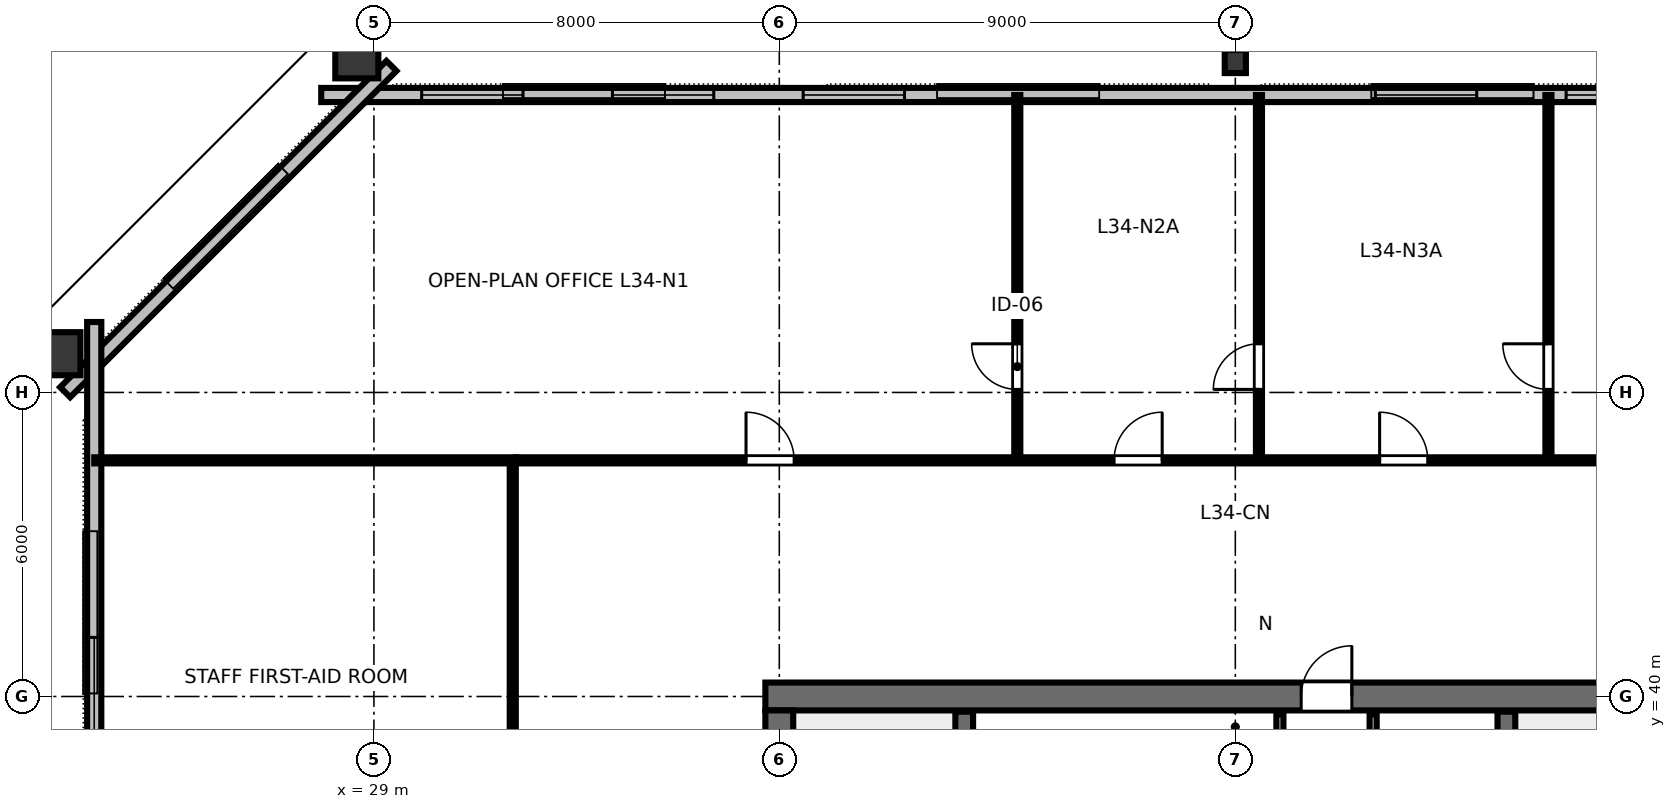
"""IFC4 building model, lengths in metres.
Left out: names, types, materials, properties, quantities, classifications, styles, units other than length and angle.
Written with IfcOpenShell. Run it as: python <this file> out.ifc"""

import sys

from ifc_helpers import new_model, si_unit, direction, frame, frame_2d, origin, origin_2d, place, context, subcontext, project, spatial, rectangle, hollow_rectangle, i_section, extrude, element, fill, save


model = new_model("IFC4")
c1 = context("Model", 3, precision=1e-05, world=origin(), true_north=direction((0.0, 1.0)))
c2 = subcontext(c1, "Body", "Model", "MODEL_VIEW")
j1 = project(units=[si_unit("LENGTHUNIT", "METRE"), si_unit("PLANEANGLEUNIT", "RADIAN")], contexts=[c1])
p1 = place(None, origin())
s1 = spatial("IfcSite", under=j1, at=p1, CompositionType="ELEMENT")
p2 = place(p1, origin())
s2 = spatial("IfcBuilding", under=s1, at=p2, CompositionType="ELEMENT")
p3 = place(p2, frame((0.0, 0.0, 131.2)))
s3 = spatial("IfcBuildingStorey", under=s2, at=p3, CompositionType="ELEMENT", Elevation=131.2)
p4 = place(p3, frame((36.725, 40.0, 0.0), z_axis=(0.0, 0.0, 1.0), x_axis=(1.0, 0.0, 0.0)))
e1 = element("IfcWall", 1, at=p4, inside=s3, PredefinedType="SHEAR", context=c2, shape_type="SweptSolid", body=[
    extrude(rectangle(XDim=18.55, YDim=0.55, at=frame_2d((9.275, 0.0))), origin(), (0.0, 0.0, 1.0), 3.36),
])
p5 = place(p4, frame((10.575, 0.0, 0.0)))
e2 = element("IfcOpeningElement", 2, at=p5, cuts=e1, PredefinedType="OPENING", context=c2, shape_type="SweptSolid", body=[
    extrude(rectangle(XDim=1.0, YDim=2.15, at=frame_2d((0.5, 1.075))), frame((0.0, 0.285, 0.0), z_axis=(0.0, -1.0, 0.0), x_axis=(1.0, 0.0, 0.0)), (0.0, 0.0, 1.0), 0.57),
])
p6 = place(p3, frame((37.0, 24.275, 0.0), z_axis=(0.0, 0.0, 1.0), x_axis=(0.0, 1.0, 0.0)))
e3 = element("IfcWall", 3, at=p6, inside=s3, PredefinedType="SHEAR", context=c2, shape_type="SweptSolid", body=[
    extrude(rectangle(XDim=15.45, YDim=0.55, at=frame_2d((7.725, 0.0))), origin(), (0.0, 0.0, 1.0), 3.36),
])
p7 = place(p6, frame((5.25, 0.0, 0.0)))
e4 = element("IfcOpeningElement", 4, at=p7, cuts=e3, PredefinedType="OPENING", context=c2, shape_type="SweptSolid", body=[
    extrude(rectangle(XDim=1.15, YDim=2.15, at=frame_2d((0.575, 1.075))), frame((0.0, 0.285, 0.0), z_axis=(0.0, -1.0, 0.0), x_axis=(1.0, 0.0, 0.0)), (0.0, 0.0, 1.0), 0.57),
])
p8 = place(p3, frame((46.0, 52.53, 0.0), z_axis=(0.0, 0.0, 1.0), x_axis=(1.0, 0.0, 0.0)))
e5 = element("IfcColumn", 5, at=p8, inside=s3, PredefinedType="COLUMN", context=c2, shape_type="SweptSolid", body=[
    extrude(i_section(OverallWidth=0.418, OverallDepth=0.455, WebThickness=0.042, FlangeThickness=0.068, FilletRadius=0.025, at=origin_2d()), origin(), (0.0, 0.0, 1.0), 3.358),
])
for number, where, z_axis, x_axis in (
    (6, (28.662, 52.698, 0.0), (0.0, 0.0, 1.0), (1.0, 0.0, 0.0)),
    (7, (22.708, 46.764, 0.0), (0.0, 0.0, 1.0), (0.0, 1.0, 0.0)),
):
    element("IfcColumn", number, at=place(p3, frame(where, z_axis=z_axis, x_axis=x_axis)), inside=s3, PredefinedType="COLUMN", context=c2, shape_type="SweptSolid", body=[
        extrude(hollow_rectangle(XDim=0.85, YDim=1.0, WallThickness=0.05, at=origin_2d()), origin(), (0.0, 0.0, 1.0), 3.358),
    ])
p9 = place(p3, frame((64.04, 51.87, 0.0), z_axis=(0.0, 0.0, 1.0), x_axis=(-1.0, 0.0, 0.0)))
e8 = element("IfcWall", 8, at=p9, inside=s3, PredefinedType="STANDARD", context=c2, shape_type="SweptSolid", body=[
    extrude(rectangle(XDim=36.08, YDim=0.28, at=frame_2d((18.04, 0.0))), origin(), (0.0, 0.0, 1.0), 3.36),
])
p10 = place(p9, frame((1.982, 0.0, 0.8)))
e9 = element("IfcOpeningElement", 9, at=p10, cuts=e8, PredefinedType="OPENING", context=c2, shape_type="SweptSolid", body=[
    extrude(rectangle(XDim=2.0, YDim=1.95, at=frame_2d((1.0, 0.975))), frame((0.0, 0.15, 0.0), z_axis=(0.0, -1.0, 0.0), x_axis=(1.0, 0.0, 0.0)), (0.0, 0.0, 1.0), 0.3),
])
p11 = place(p9, frame((5.747, 0.0, 0.8)))
e10 = element("IfcOpeningElement", 10, at=p11, cuts=e8, PredefinedType="OPENING", context=c2, shape_type="SweptSolid", body=[
    extrude(rectangle(XDim=2.0, YDim=1.95, at=frame_2d((1.0, 0.975))), frame((0.0, 0.15, 0.0), z_axis=(0.0, -1.0, 0.0), x_axis=(1.0, 0.0, 0.0)), (0.0, 0.0, 1.0), 0.3),
])
p12 = place(p9, frame((9.511, 0.0, 0.8)))
e11 = element("IfcOpeningElement", 11, at=p12, cuts=e8, PredefinedType="OPENING", context=c2, shape_type="SweptSolid", body=[
    extrude(rectangle(XDim=2.0, YDim=1.95, at=frame_2d((1.0, 0.975))), frame((0.0, 0.15, 0.0), z_axis=(0.0, -1.0, 0.0), x_axis=(1.0, 0.0, 0.0)), (0.0, 0.0, 1.0), 0.3),
])
p13 = place(p9, frame((13.276, 0.0, 0.8)))
e12 = element("IfcOpeningElement", 12, at=p13, cuts=e8, PredefinedType="OPENING", context=c2, shape_type="SweptSolid", body=[
    extrude(rectangle(XDim=2.0, YDim=1.95, at=frame_2d((1.0, 0.975))), frame((0.0, 0.15, 0.0), z_axis=(0.0, -1.0, 0.0), x_axis=(1.0, 0.0, 0.0)), (0.0, 0.0, 1.0), 0.3),
])
p14 = place(p9, frame((24.569, 0.0, 0.8)))
e13 = element("IfcOpeningElement", 13, at=p14, cuts=e8, PredefinedType="OPENING", context=c2, shape_type="SweptSolid", body=[
    extrude(rectangle(XDim=2.0, YDim=1.95, at=frame_2d((1.0, 0.975))), frame((0.0, 0.15, 0.0), z_axis=(0.0, -1.0, 0.0), x_axis=(1.0, 0.0, 0.0)), (0.0, 0.0, 1.0), 0.3),
])
p15 = place(p9, frame((28.333, 0.0, 0.8)))
e14 = element("IfcOpeningElement", 14, at=p15, cuts=e8, PredefinedType="OPENING", context=c2, shape_type="SweptSolid", body=[
    extrude(rectangle(XDim=2.0, YDim=1.95, at=frame_2d((1.0, 0.975))), frame((0.0, 0.15, 0.0), z_axis=(0.0, -1.0, 0.0), x_axis=(1.0, 0.0, 0.0)), (0.0, 0.0, 1.0), 0.3),
])
p16 = place(p9, frame((32.098, 0.0, 0.8)))
e15 = element("IfcOpeningElement", 15, at=p16, cuts=e8, PredefinedType="OPENING", context=c2, shape_type="SweptSolid", body=[
    extrude(rectangle(XDim=2.0, YDim=1.95, at=frame_2d((1.0, 0.975))), frame((0.0, 0.15, 0.0), z_axis=(0.0, -1.0, 0.0), x_axis=(1.0, 0.0, 0.0)), (0.0, 0.0, 1.0), 0.3),
])
p17 = place(p3, frame((29.345, 52.444, 0.0), z_axis=(0.0, 0.0, 1.0), x_axis=(-0.707106781187, -0.707106781187, 0.0)))
e16 = element("IfcWall", 16, at=p17, inside=s3, PredefinedType="STANDARD", context=c2, shape_type="SweptSolid", body=[
    extrude(rectangle(XDim=9.107, YDim=0.28, at=frame_2d((4.553, 0.0))), origin(), (0.0, 0.0, 1.0), 3.36),
])
p18 = place(p3, frame((23.48, 47.39, 0.0), z_axis=(0.0, 0.0, 1.0), x_axis=(0.0, -1.0, 0.0)))
e17 = element("IfcWall", 17, at=p18, inside=s3, PredefinedType="STANDARD", context=c2, shape_type="SweptSolid", body=[
    extrude(rectangle(XDim=30.78, YDim=0.28, at=frame_2d((15.39, 0.0))), origin(), (0.0, 0.0, 1.0), 3.36),
])
p19 = place(p18, frame((6.224, 0.0, 0.8)))
e18 = element("IfcOpeningElement", 18, at=p19, cuts=e17, PredefinedType="OPENING", context=c2, shape_type="SweptSolid", body=[
    extrude(rectangle(XDim=2.0, YDim=1.95, at=frame_2d((1.0, 0.975))), frame((0.0, 0.15, 0.0), z_axis=(0.0, -1.0, 0.0), x_axis=(1.0, 0.0, 0.0)), (0.0, 0.0, 1.0), 0.3),
])
p20 = place(p18, frame((10.307, 0.0, 0.8)))
e19 = element("IfcOpeningElement", 19, at=p20, cuts=e17, PredefinedType="OPENING", context=c2, shape_type="SweptSolid", body=[
    extrude(rectangle(XDim=2.0, YDim=1.95, at=frame_2d((1.0, 0.975))), frame((0.0, 0.15, 0.0), z_axis=(0.0, -1.0, 0.0), x_axis=(1.0, 0.0, 0.0)), (0.0, 0.0, 1.0), 0.3),
])
p21 = place(p18, frame((18.473, 0.0, 0.8)))
e20 = element("IfcOpeningElement", 20, at=p21, cuts=e17, PredefinedType="OPENING", context=c2, shape_type="SweptSolid", body=[
    extrude(rectangle(XDim=2.0, YDim=1.95, at=frame_2d((1.0, 0.975))), frame((0.0, 0.15, 0.0), z_axis=(0.0, -1.0, 0.0), x_axis=(1.0, 0.0, 0.0)), (0.0, 0.0, 1.0), 0.3),
])
p22 = place(p18, frame((22.556, 0.0, 0.8)))
e21 = element("IfcOpeningElement", 21, at=p22, cuts=e17, PredefinedType="OPENING", context=c2, shape_type="SweptSolid", body=[
    extrude(rectangle(XDim=2.0, YDim=1.95, at=frame_2d((1.0, 0.975))), frame((0.0, 0.15, 0.0), z_axis=(0.0, -1.0, 0.0), x_axis=(1.0, 0.0, 0.0)), (0.0, 0.0, 1.0), 0.3),
])
for number, where, z_axis, x_axis in (
    (22, (40.65, 32.0, 0.0), (0.0, 0.0, 1.0), (0.0, 1.0, 0.0)),
    (23, (51.35, 32.0, 0.0), (0.0, 0.0, 1.0), (0.0, 1.0, 0.0)),
):
    element("IfcWall", number, at=place(p3, frame(where, z_axis=z_axis, x_axis=x_axis)), inside=s3, PredefinedType="SHEAR", context=c2, shape_type="SweptSolid", body=[
        extrude(rectangle(XDim=7.7, YDim=0.35, at=frame_2d((3.85, 0.0))), origin(), (0.0, 0.0, 1.0), 3.6),
    ])
p23 = place(p3, frame((46.88, 32.05, 0.0), z_axis=(0.0, 0.0, 1.0), x_axis=(0.0, 1.0, 0.0)))
e24 = element("IfcWall", 24, at=p23, inside=s3, PredefinedType="PARTITIONING", context=c2, shape_type="SweptSolid", body=[
    extrude(rectangle(XDim=7.6, YDim=0.14, at=frame_2d((3.8, 0.0))), origin(), (0.0, 0.0, 1.0), 3.36),
])
p24 = place(p23, frame((3.4, 0.0, 0.0)))
e25 = element("IfcOpeningElement", 25, at=p24, cuts=e24, PredefinedType="OPENING", context=c2, shape_type="SweptSolid", body=[
    extrude(rectangle(XDim=0.95, YDim=2.15, at=frame_2d((0.475, 1.075))), frame((0.0, 0.08, 0.0), z_axis=(0.0, -1.0, 0.0), x_axis=(1.0, 0.0, 0.0)), (0.0, 0.0, 1.0), 0.16),
])
p25 = place(p3, frame((48.72, 32.05, 0.0), z_axis=(0.0, 0.0, 1.0), x_axis=(0.0, 1.0, 0.0)))
e26 = element("IfcWall", 26, at=p25, inside=s3, PredefinedType="PARTITIONING", context=c2, shape_type="SweptSolid", body=[
    extrude(rectangle(XDim=7.6, YDim=0.14, at=frame_2d((3.8, 0.0))), origin(), (0.0, 0.0, 1.0), 3.36),
])
p26 = place(p25, frame((0.8, 0.0, 0.0)))
e27 = element("IfcOpeningElement", 27, at=p26, cuts=e26, PredefinedType="OPENING", context=c2, shape_type="SweptSolid", body=[
    extrude(rectangle(XDim=0.9, YDim=2.15, at=frame_2d((0.45, 1.075))), frame((0.0, 0.08, 0.0), z_axis=(0.0, -1.0, 0.0), x_axis=(1.0, 0.0, 0.0)), (0.0, 0.0, 1.0), 0.16),
])
p27 = place(p25, frame((3.35, 0.0, 0.0)))
e28 = element("IfcOpeningElement", 28, at=p27, cuts=e26, PredefinedType="OPENING", context=c2, shape_type="SweptSolid", body=[
    extrude(rectangle(XDim=0.9, YDim=2.15, at=frame_2d((0.45, 1.075))), frame((0.0, 0.08, 0.0), z_axis=(0.0, -1.0, 0.0), x_axis=(1.0, 0.0, 0.0)), (0.0, 0.0, 1.0), 0.16),
])
p28 = place(p25, frame((5.9, 0.0, 0.0)))
e29 = element("IfcOpeningElement", 29, at=p28, cuts=e26, PredefinedType="OPENING", context=c2, shape_type="SweptSolid", body=[
    extrude(rectangle(XDim=0.92, YDim=2.15, at=frame_2d((0.46, 1.075))), frame((0.0, 0.08, 0.0), z_axis=(0.0, -1.0, 0.0), x_axis=(1.0, 0.0, 0.0)), (0.0, 0.0, 1.0), 0.16),
])
p29 = place(p3, frame((41.697, 44.66, 0.0), z_axis=(0.0, 0.0, 1.0), x_axis=(0.0, 1.0, 0.0)))
e30 = element("IfcWall", 30, at=p29, inside=s3, PredefinedType="PARTITIONING", context=c2, shape_type="SweptSolid", body=[
    extrude(rectangle(XDim=7.21, YDim=0.12, at=frame_2d((3.605, 0.0))), origin(), (0.0, 0.0, 1.0), 2.64),
])
p30 = place(p29, frame((1.4, 0.0, 0.0)))
e31 = element("IfcOpeningElement", 31, at=p30, cuts=e30, PredefinedType="OPENING", context=c2, shape_type="SweptSolid", body=[
    extrude(rectangle(XDim=0.9, YDim=2.15, at=frame_2d((0.45, 1.075))), frame((0.0, 0.07, 0.0), z_axis=(0.0, -1.0, 0.0), x_axis=(1.0, 0.0, 0.0)), (0.0, 0.0, 1.0), 0.14),
])
p31 = place(p3, frame((46.467, 44.66, 0.0), z_axis=(0.0, 0.0, 1.0), x_axis=(0.0, 1.0, 0.0)))
e32 = element("IfcWall", 32, at=p31, inside=s3, PredefinedType="PARTITIONING", context=c2, shape_type="SweptSolid", body=[
    extrude(rectangle(XDim=7.21, YDim=0.12, at=frame_2d((3.605, 0.0))), origin(), (0.0, 0.0, 1.0), 2.64),
])
p32 = place(p31, frame((1.4, 0.0, 0.0)))
e33 = element("IfcOpeningElement", 33, at=p32, cuts=e32, PredefinedType="OPENING", context=c2, shape_type="SweptSolid", body=[
    extrude(rectangle(XDim=0.9, YDim=2.15, at=frame_2d((0.45, 1.075))), frame((0.0, 0.07, 0.0), z_axis=(0.0, -1.0, 0.0), x_axis=(1.0, 0.0, 0.0)), (0.0, 0.0, 1.0), 0.14),
])
p33 = place(p3, frame((52.179, 44.66, 0.0), z_axis=(0.0, 0.0, 1.0), x_axis=(0.0, 1.0, 0.0)))
e34 = element("IfcWall", 34, at=p33, inside=s3, PredefinedType="PARTITIONING", context=c2, shape_type="SweptSolid", body=[
    extrude(rectangle(XDim=7.21, YDim=0.12, at=frame_2d((3.605, 0.0))), origin(), (0.0, 0.0, 1.0), 2.64),
])
p34 = place(p33, frame((1.4, 0.0, 0.0)))
e35 = element("IfcOpeningElement", 35, at=p34, cuts=e34, PredefinedType="OPENING", context=c2, shape_type="SweptSolid", body=[
    extrude(rectangle(XDim=0.9, YDim=2.15, at=frame_2d((0.45, 1.075))), frame((0.0, 0.07, 0.0), z_axis=(0.0, -1.0, 0.0), x_axis=(1.0, 0.0, 0.0)), (0.0, 0.0, 1.0), 0.14),
])
p35 = place(p3, frame((31.8, 44.66, 0.0), z_axis=(0.0, 0.0, 1.0), x_axis=(1.0, 0.0, 0.0)))
e36 = element("IfcWall", 36, at=p35, inside=s3, PredefinedType="PARTITIONING", context=c2, shape_type="SweptSolid", body=[
    extrude(rectangle(XDim=28.4, YDim=0.12, at=frame_2d((14.2, 0.0))), origin(), (0.0, 0.0, 1.0), 2.64),
])
p36 = place(p35, frame((4.544, 0.0, 0.0)))
e37 = element("IfcOpeningElement", 37, at=p36, cuts=e36, PredefinedType="OPENING", context=c2, shape_type="SweptSolid", body=[
    extrude(rectangle(XDim=0.95, YDim=2.15, at=frame_2d((0.475, 1.075))), frame((0.0, 0.07, 0.0), z_axis=(0.0, -1.0, 0.0), x_axis=(1.0, 0.0, 0.0)), (0.0, 0.0, 1.0), 0.14),
])
p37 = place(p35, frame((11.807, 0.0, 0.0)))
e38 = element("IfcOpeningElement", 38, at=p37, cuts=e36, PredefinedType="OPENING", context=c2, shape_type="SweptSolid", body=[
    extrude(rectangle(XDim=0.95, YDim=2.15, at=frame_2d((0.475, 1.075))), frame((0.0, 0.07, 0.0), z_axis=(0.0, -1.0, 0.0), x_axis=(1.0, 0.0, 0.0)), (0.0, 0.0, 1.0), 0.14),
])
p38 = place(p35, frame((17.048, 0.0, 0.0)))
e39 = element("IfcOpeningElement", 39, at=p38, cuts=e36, PredefinedType="OPENING", context=c2, shape_type="SweptSolid", body=[
    extrude(rectangle(XDim=0.95, YDim=2.15, at=frame_2d((0.475, 1.075))), frame((0.0, 0.07, 0.0), z_axis=(0.0, -1.0, 0.0), x_axis=(1.0, 0.0, 0.0)), (0.0, 0.0, 1.0), 0.14),
])
p39 = place(p35, frame((23.845, 0.0, 0.0)))
e40 = element("IfcOpeningElement", 40, at=p39, cuts=e36, PredefinedType="OPENING", context=c2, shape_type="SweptSolid", body=[
    extrude(rectangle(XDim=0.95, YDim=2.15, at=frame_2d((0.475, 1.075))), frame((0.0, 0.07, 0.0), z_axis=(0.0, -1.0, 0.0), x_axis=(1.0, 0.0, 0.0)), (0.0, 0.0, 1.0), 0.14),
])
p40 = place(p3, frame((31.74, 33.02, 0.0), z_axis=(0.0, 0.0, 1.0), x_axis=(0.0, 1.0, 0.0)))
e41 = element("IfcWall", 41, at=p40, inside=s3, PredefinedType="PARTITIONING", context=c2, shape_type="SweptSolid", body=[
    extrude(rectangle(XDim=11.58, YDim=0.12, at=frame_2d((5.79, 0.0))), origin(), (0.0, 0.0, 1.0), 2.64),
])
p41 = place(p40, frame((5.215, 0.0, 0.0)))
e42 = element("IfcOpeningElement", 42, at=p41, cuts=e41, PredefinedType="OPENING", context=c2, shape_type="SweptSolid", body=[
    extrude(rectangle(XDim=0.95, YDim=2.15, at=frame_2d((0.475, 1.075))), frame((0.0, 0.07, 0.0), z_axis=(0.0, -1.0, 0.0), x_axis=(1.0, 0.0, 0.0)), (0.0, 0.0, 1.0), 0.14),
])
p42 = place(p3, frame((31.8, 44.66, 0.0), z_axis=(0.0, 0.0, 1.0), x_axis=(-1.0, 0.0, 0.0)))
e43 = element("IfcWall", 43, at=p42, inside=s3, PredefinedType="PARTITIONING", context=c2, shape_type="SweptSolid", body=[
    extrude(rectangle(XDim=8.32, YDim=0.12, at=frame_2d((4.16, 0.0))), origin(), (0.0, 0.0, 1.0), 2.64),
])
p43 = place(p12, origin())
e44 = element("IfcWindow", 44, at=p43, inside=s3, PartitioningType="SINGLE_PANEL", PredefinedType="WINDOW", context=c2, shape_type="SweptSolid", body=[
    extrude(rectangle(XDim=2.0, YDim=1.95, at=frame_2d((1.0, 0.975))), frame((0.0, 0.03, 0.0), z_axis=(0.0, -1.0, 0.0), x_axis=(1.0, 0.0, 0.0)), (0.0, 0.0, 1.0), 0.06),
])
fill(e11, e44)
p44 = place(p13, origin())
e45 = element("IfcWindow", 45, at=p44, inside=s3, PartitioningType="SINGLE_PANEL", PredefinedType="WINDOW", context=c2, shape_type="SweptSolid", body=[
    extrude(rectangle(XDim=2.0, YDim=1.95, at=frame_2d((1.0, 0.975))), frame((0.0, 0.03, 0.0), z_axis=(0.0, -1.0, 0.0), x_axis=(1.0, 0.0, 0.0)), (0.0, 0.0, 1.0), 0.06),
])
fill(e12, e45)
p45 = place(p14, origin())
e46 = element("IfcWindow", 46, at=p45, inside=s3, PartitioningType="SINGLE_PANEL", PredefinedType="WINDOW", context=c2, shape_type="SweptSolid", body=[
    extrude(rectangle(XDim=2.0, YDim=1.95, at=frame_2d((1.0, 0.975))), frame((0.0, 0.03, 0.0), z_axis=(0.0, -1.0, 0.0), x_axis=(1.0, 0.0, 0.0)), (0.0, 0.0, 1.0), 0.06),
])
fill(e13, e46)
p46 = place(p15, origin())
e47 = element("IfcWindow", 47, at=p46, inside=s3, PartitioningType="SINGLE_PANEL", PredefinedType="WINDOW", context=c2, shape_type="SweptSolid", body=[
    extrude(rectangle(XDim=2.0, YDim=1.95, at=frame_2d((1.0, 0.975))), frame((0.0, 0.03, 0.0), z_axis=(0.0, -1.0, 0.0), x_axis=(1.0, 0.0, 0.0)), (0.0, 0.0, 1.0), 0.06),
])
fill(e14, e47)
p47 = place(p16, origin())
e48 = element("IfcWindow", 48, at=p47, inside=s3, PartitioningType="SINGLE_PANEL", PredefinedType="WINDOW", context=c2, shape_type="SweptSolid", body=[
    extrude(rectangle(XDim=2.0, YDim=1.95, at=frame_2d((1.0, 0.975))), frame((0.0, 0.03, 0.0), z_axis=(0.0, -1.0, 0.0), x_axis=(1.0, 0.0, 0.0)), (0.0, 0.0, 1.0), 0.06),
])
fill(e15, e48)
p48 = place(p19, origin())
e49 = element("IfcWindow", 49, at=p48, inside=s3, PartitioningType="SINGLE_PANEL", PredefinedType="WINDOW", context=c2, shape_type="SweptSolid", body=[
    extrude(rectangle(XDim=2.0, YDim=1.95, at=frame_2d((1.0, 0.975))), frame((0.0, 0.03, 0.0), z_axis=(0.0, -1.0, 0.0), x_axis=(1.0, 0.0, 0.0)), (0.0, 0.0, 1.0), 0.06),
])
fill(e18, e49)
p49 = place(p5, origin())
e50 = element("IfcDoor", 50, at=p49, inside=s3, OperationType="SINGLE_SWING_RIGHT", PredefinedType="DOOR", context=c2, shape_type="SweptSolid", body=[
    extrude(rectangle(XDim=1.0, YDim=2.15, at=frame_2d((0.5, 1.075))), frame((0.0, 0.025, 0.0), z_axis=(0.0, -1.0, 0.0), x_axis=(1.0, 0.0, 0.0)), (0.0, 0.0, 1.0), 0.05),
])
fill(e2, e50)
p50 = place(p30, origin())
e51 = element("IfcDoor", 51, at=p50, inside=s3, OperationType="SINGLE_SWING_RIGHT", PredefinedType="DOOR", context=c2, shape_type="SweptSolid", body=[
    extrude(rectangle(XDim=0.9, YDim=2.15, at=frame_2d((0.45, 1.075))), frame((0.0, 0.025, 0.0), z_axis=(0.0, -1.0, 0.0), x_axis=(1.0, 0.0, 0.0)), (0.0, 0.0, 1.0), 0.05),
])
fill(e31, e51)
p51 = place(p32, origin())
e52 = element("IfcDoor", 52, at=p51, inside=s3, OperationType="SINGLE_SWING_LEFT", PredefinedType="DOOR", context=c2, shape_type="SweptSolid", body=[
    extrude(rectangle(XDim=0.9, YDim=2.15, at=frame_2d((0.45, 1.075))), frame((0.0, 0.025, 0.0), z_axis=(0.0, -1.0, 0.0), x_axis=(1.0, 0.0, 0.0)), (0.0, 0.0, 1.0), 0.05),
])
fill(e33, e52)
p52 = place(p34, origin())
e53 = element("IfcDoor", 53, at=p52, inside=s3, OperationType="SINGLE_SWING_RIGHT", PredefinedType="DOOR", context=c2, shape_type="SweptSolid", body=[
    extrude(rectangle(XDim=0.9, YDim=2.15, at=frame_2d((0.45, 1.075))), frame((0.0, 0.025, 0.0), z_axis=(0.0, -1.0, 0.0), x_axis=(1.0, 0.0, 0.0)), (0.0, 0.0, 1.0), 0.05),
])
fill(e35, e53)
p53 = place(p36, origin())
e54 = element("IfcDoor", 54, at=p53, inside=s3, OperationType="SINGLE_SWING_LEFT", PredefinedType="DOOR", context=c2, shape_type="SweptSolid", body=[
    extrude(rectangle(XDim=0.95, YDim=2.15, at=frame_2d((0.475, 1.075))), frame((0.0, 0.025, 0.0), z_axis=(0.0, -1.0, 0.0), x_axis=(1.0, 0.0, 0.0)), (0.0, 0.0, 1.0), 0.05),
])
fill(e37, e54)
p54 = place(p37, origin())
e55 = element("IfcDoor", 55, at=p54, inside=s3, OperationType="SINGLE_SWING_RIGHT", PredefinedType="DOOR", context=c2, shape_type="SweptSolid", body=[
    extrude(rectangle(XDim=0.95, YDim=2.15, at=frame_2d((0.475, 1.075))), frame((0.0, 0.025, 0.0), z_axis=(0.0, -1.0, 0.0), x_axis=(1.0, 0.0, 0.0)), (0.0, 0.0, 1.0), 0.05),
])
fill(e38, e55)
p55 = place(p38, origin())
e56 = element("IfcDoor", 56, at=p55, inside=s3, OperationType="SINGLE_SWING_LEFT", PredefinedType="DOOR", context=c2, shape_type="SweptSolid", body=[
    extrude(rectangle(XDim=0.95, YDim=2.15, at=frame_2d((0.475, 1.075))), frame((0.0, 0.025, 0.0), z_axis=(0.0, -1.0, 0.0), x_axis=(1.0, 0.0, 0.0)), (0.0, 0.0, 1.0), 0.05),
])
fill(e39, e56)
save(model, sys.argv[1])
